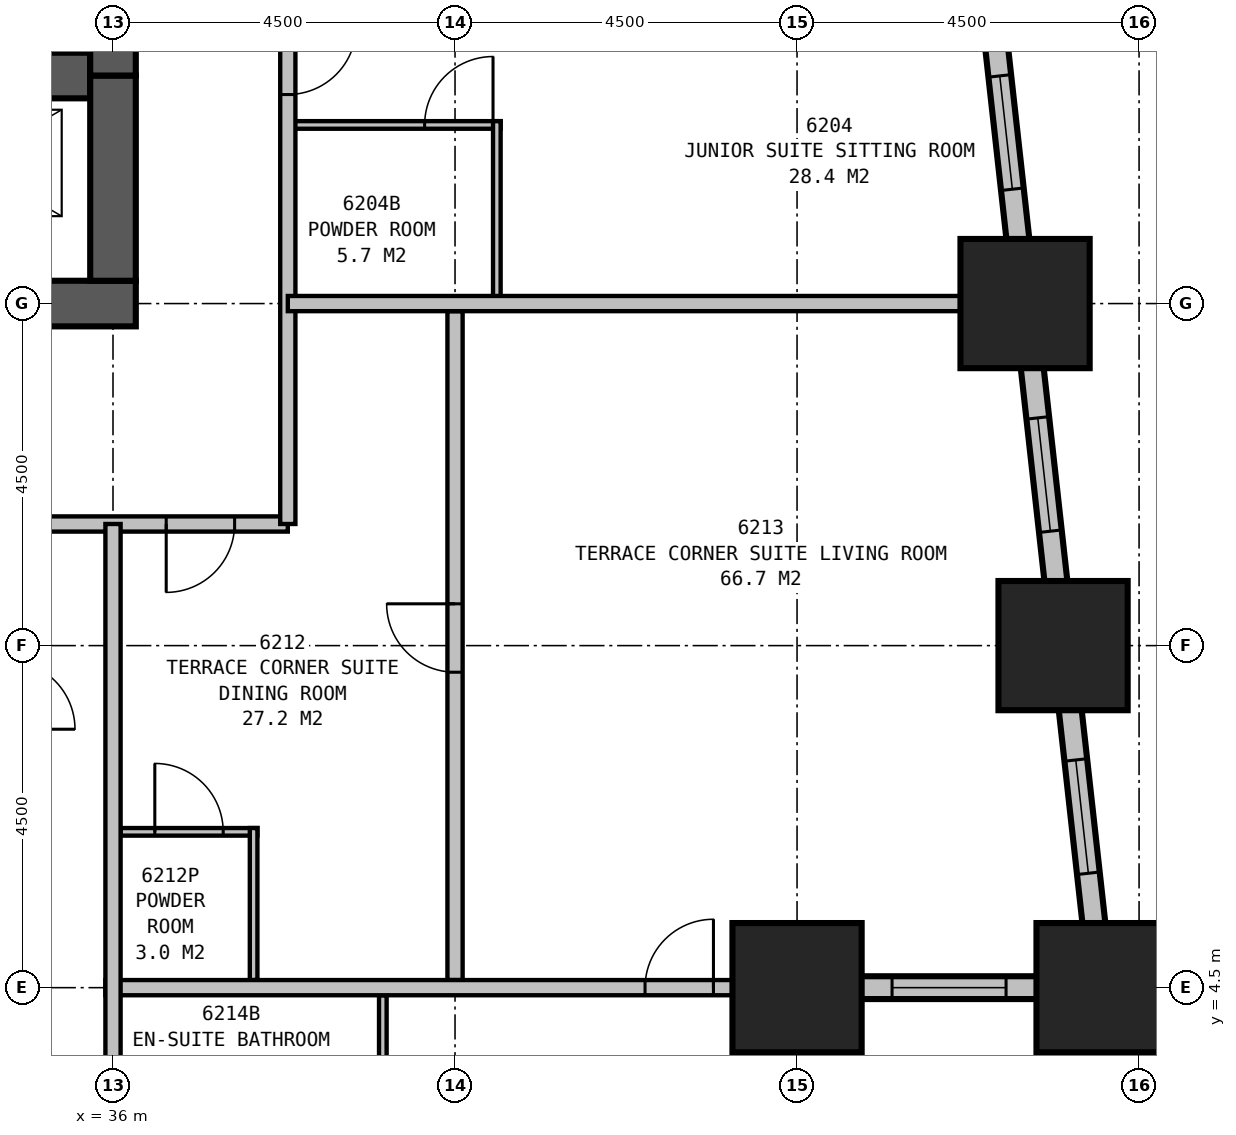
"""IFC4 building model, lengths in metres.
Left out: names, types, materials, properties, quantities, classifications, styles, units other than length and angle.
Written with IfcOpenShell. Run it as: python <this file> out.ifc"""

import sys

from ifc_helpers import new_model, si_unit, direction, frame, frame_2d, origin, origin_2d, place, context, subcontext, project, spatial, rectangle, extrude, element, fill, save


model = new_model("IFC4")
c1 = context("Model", 3, precision=1e-05, world=origin(), true_north=direction((0.0, 1.0)))
c2 = subcontext(c1, "Body", "Model", "MODEL_VIEW")
j1 = project(units=[si_unit("LENGTHUNIT", "METRE"), si_unit("PLANEANGLEUNIT", "RADIAN")], contexts=[c1])
p1 = place(None, origin())
s1 = spatial("IfcSite", under=j1, at=p1, CompositionType="ELEMENT")
p2 = place(p1, origin())
s2 = spatial("IfcBuilding", under=s1, at=p2, CompositionType="ELEMENT")
p3 = place(p2, frame((0.0, 0.0, 240.8)))
s3 = spatial("IfcBuildingStorey", under=s2, at=p3, CompositionType="ELEMENT", Elevation=240.8)
for number, where, z_axis, x_axis in (
    (1, (45.0, 4.5, 0.0), (0.0, 0.0, 1.0), (1.0, 0.0, 0.0)),
    (2, (49.0, 4.5, 0.0), (0.0, 0.0, 1.0), (1.0, 0.0, 0.0)),
    (3, (48.5, 9.0, 0.0), (0.0, 0.0, 1.0), (1.0, 0.0, 0.0)),
    (4, (48.0, 13.5, 0.0), (0.0, 0.0, 1.0), (1.0, 0.0, 0.0)),
):
    element("IfcColumn", number, at=place(p3, frame(where, z_axis=z_axis, x_axis=x_axis)), inside=s3, PredefinedType="COLUMN", context=c2, shape_type="SweptSolid", body=[
        extrude(rectangle(XDim=1.7, YDim=1.7, at=origin_2d()), origin(), (0.0, 0.0, 1.0), 3.9),
    ])
p4 = place(p3, frame((13.2, 13.5, 0.0), z_axis=(0.0, 0.0, 1.0), x_axis=(1.0, 0.0, 0.0)))
e5 = element("IfcWall", 5, at=p4, inside=s3, PredefinedType="SHEAR", context=c2, shape_type="SweptSolid", body=[
    extrude(rectangle(XDim=23.1, YDim=0.6, at=frame_2d((11.55, 0.0))), origin(), (0.0, 0.0, 1.0), 3.9),
])
p5 = place(p3, frame((13.8, 16.5, 0.0), z_axis=(0.0, 0.0, 1.0), x_axis=(1.0, 0.0, 0.0)))
e6 = element("IfcWall", 6, at=p5, inside=s3, PredefinedType="SHEAR", context=c2, shape_type="SweptSolid", body=[
    extrude(rectangle(XDim=21.9, YDim=0.6, at=frame_2d((10.95, 0.0))), origin(), (0.0, 0.0, 1.0), 3.9),
])
p6 = place(p5, frame((5.75, 0.0, 0.0), z_axis=(0.0, 0.0, 1.0), x_axis=(-1.0, 0.0, 0.0)))
e7 = element("IfcOpeningElement", 7, at=p6, cuts=e6, PredefinedType="OPENING", context=c2, shape_type="SweptSolid", body=[
    extrude(rectangle(XDim=1.0, YDim=2.1, at=frame_2d((0.5, 1.05))), frame((0.0, 0.31, 0.0), z_axis=(0.0, -1.0, 0.0), x_axis=(1.0, 0.0, 0.0)), (0.0, 0.0, 1.0), 0.62),
])
p7 = place(p5, frame((10.2, 0.0, 0.0), z_axis=(0.0, 0.0, 1.0), x_axis=(-1.0, 0.0, 0.0)))
e8 = element("IfcOpeningElement", 8, at=p7, cuts=e6, PredefinedType="OPENING", context=c2, shape_type="SweptSolid", body=[
    extrude(rectangle(XDim=1.0, YDim=2.1, at=frame_2d((0.5, 1.05))), frame((0.0, 0.31, 0.0), z_axis=(0.0, -1.0, 0.0), x_axis=(1.0, 0.0, 0.0)), (0.0, 0.0, 1.0), 0.62),
])
p8 = place(p5, frame((12.7, 0.0, 0.0), z_axis=(0.0, 0.0, 1.0), x_axis=(-1.0, 0.0, 0.0)))
e9 = element("IfcOpeningElement", 9, at=p8, cuts=e6, PredefinedType="OPENING", context=c2, shape_type="SweptSolid", body=[
    extrude(rectangle(XDim=1.0, YDim=2.1, at=frame_2d((0.5, 1.05))), frame((0.0, 0.31, 0.0), z_axis=(0.0, -1.0, 0.0), x_axis=(1.0, 0.0, 0.0)), (0.0, 0.0, 1.0), 0.62),
])
p9 = place(p5, frame((17.15, 0.0, 0.0), z_axis=(0.0, 0.0, 1.0), x_axis=(-1.0, 0.0, 0.0)))
e10 = element("IfcOpeningElement", 10, at=p9, cuts=e6, PredefinedType="OPENING", context=c2, shape_type="SweptSolid", body=[
    extrude(rectangle(XDim=1.0, YDim=2.1, at=frame_2d((0.5, 1.05))), frame((0.0, 0.31, 0.0), z_axis=(0.0, -1.0, 0.0), x_axis=(1.0, 0.0, 0.0)), (0.0, 0.0, 1.0), 0.62),
])
p10 = place(p5, frame((0.6, 0.0, 0.0)))
e11 = element("IfcOpeningElement", 11, at=p10, cuts=e6, PredefinedType="OPENING", context=c2, shape_type="SweptSolid", body=[
    extrude(rectangle(XDim=1.2, YDim=2.1, at=frame_2d((0.6, 1.05))), frame((0.0, 0.31, 0.0), z_axis=(0.0, -1.0, 0.0), x_axis=(1.0, 0.0, 0.0)), (0.0, 0.0, 1.0), 0.62),
])
p11 = place(p5, frame((19.6, 0.0, 0.0)))
e12 = element("IfcOpeningElement", 12, at=p11, cuts=e6, PredefinedType="OPENING", context=c2, shape_type="SweptSolid", body=[
    extrude(rectangle(XDim=1.2, YDim=2.1, at=frame_2d((0.6, 1.05))), frame((0.0, 0.31, 0.0), z_axis=(0.0, -1.0, 0.0), x_axis=(1.0, 0.0, 0.0)), (0.0, 0.0, 1.0), 0.62),
])
p12 = place(p3, frame((36.0, 13.8, 0.0), z_axis=(0.0, 0.0, 1.0), x_axis=(0.0, 1.0, 0.0)))
e13 = element("IfcWall", 13, at=p12, inside=s3, PredefinedType="SHEAR", context=c2, shape_type="SweptSolid", body=[
    extrude(rectangle(XDim=2.7, YDim=0.6, at=frame_2d((1.35, 0.0))), origin(), (0.0, 0.0, 1.0), 3.9),
])
p13 = place(p3, frame((36.0, 16.5, 0.0), z_axis=(0.0, 0.0, 1.0), x_axis=(0.0, 1.0, 0.0)))
e14 = element("IfcWall", 14, at=p13, inside=s3, PredefinedType="SHEAR", context=c2, shape_type="SweptSolid", body=[
    extrude(rectangle(XDim=3.5, YDim=0.6, at=frame_2d((1.75, 0.0))), origin(), (0.0, 0.0, 1.0), 3.9),
])
p14 = place(p13, frame((0.65, 0.0, 0.0)))
e15 = element("IfcOpeningElement", 15, at=p14, cuts=e14, PredefinedType="OPENING", context=c2, shape_type="SweptSolid", body=[
    extrude(rectangle(XDim=1.2, YDim=2.1, at=frame_2d((0.6, 1.05))), frame((0.0, 0.31, 0.0), z_axis=(0.0, -1.0, 0.0), x_axis=(1.0, 0.0, 0.0)), (0.0, 0.0, 1.0), 0.62),
])
p15 = place(p3, frame((45.0, -0.15, 0.0), z_axis=(0.0, 0.0, 1.0), x_axis=(0.0, 1.0, 0.0)))
e16 = element("IfcWall", 16, at=p15, inside=s3, PredefinedType="STANDARD", context=c2, shape_type="SweptSolid", body=[
    extrude(rectangle(XDim=4.8, YDim=0.3, at=frame_2d((2.4, 0.0))), origin(), (0.0, 0.0, 1.0), 2.45),
])
p16 = place(p15, frame((1.2, 0.0, 0.5)))
e17 = element("IfcOpeningElement", 17, at=p16, cuts=e16, PredefinedType="OPENING", context=c2, shape_type="SweptSolid", body=[
    extrude(rectangle(XDim=2.4, YDim=1.75, at=frame_2d((1.2, 0.875))), frame((0.0, 0.16, 0.0), z_axis=(0.0, -1.0, 0.0), x_axis=(1.0, 0.0, 0.0)), (0.0, 0.0, 1.0), 0.32),
])
p17 = place(p3, frame((44.85, 4.5, 0.0), z_axis=(0.0, 0.0, 1.0), x_axis=(1.0, 0.0, 0.0)))
e18 = element("IfcWall", 18, at=p17, inside=s3, PredefinedType="STANDARD", context=c2, shape_type="SweptSolid", body=[
    extrude(rectangle(XDim=4.3, YDim=0.3, at=frame_2d((2.15, 0.0))), origin(), (0.0, 0.0, 1.0), 2.45),
])
p18 = place(p17, frame((1.4, 0.0, 0.5)))
e19 = element("IfcOpeningElement", 19, at=p18, cuts=e18, PredefinedType="OPENING", context=c2, shape_type="SweptSolid", body=[
    extrude(rectangle(XDim=1.5, YDim=1.75, at=frame_2d((0.75, 0.875))), frame((0.0, 0.16, 0.0), z_axis=(0.0, -1.0, 0.0), x_axis=(1.0, 0.0, 0.0)), (0.0, 0.0, 1.0), 0.32),
])
p19 = place(p3, frame((49.017, 4.351, 0.0), z_axis=(0.0, 0.0, 1.0), x_axis=(-0.110433201132, 0.993883548555, 0.0)))
e20 = element("IfcWall", 20, at=p19, inside=s3, PredefinedType="STANDARD", context=c2, shape_type="SweptSolid", body=[
    extrude(rectangle(XDim=31.994, YDim=0.3, at=frame_2d((15.997, 0.0))), origin(), (0.0, 0.0, 1.0), 2.45),
])
p20 = place(p19, frame((1.664, 0.0, 0.5)))
e21 = element("IfcOpeningElement", 21, at=p20, cuts=e20, PredefinedType="OPENING", context=c2, shape_type="SweptSolid", body=[
    extrude(rectangle(XDim=1.5, YDim=1.75, at=frame_2d((0.75, 0.875))), frame((0.0, 0.16, 0.0), z_axis=(0.0, -1.0, 0.0), x_axis=(1.0, 0.0, 0.0)), (0.0, 0.0, 1.0), 0.32),
])
p21 = place(p19, frame((6.192, 0.0, 0.5)))
e22 = element("IfcOpeningElement", 22, at=p21, cuts=e20, PredefinedType="OPENING", context=c2, shape_type="SweptSolid", body=[
    extrude(rectangle(XDim=1.5, YDim=1.75, at=frame_2d((0.75, 0.875))), frame((0.0, 0.16, 0.0), z_axis=(0.0, -1.0, 0.0), x_axis=(1.0, 0.0, 0.0)), (0.0, 0.0, 1.0), 0.32),
])
p22 = place(p19, frame((10.719, 0.0, 0.5)))
e23 = element("IfcOpeningElement", 23, at=p22, cuts=e20, PredefinedType="OPENING", context=c2, shape_type="SweptSolid", body=[
    extrude(rectangle(XDim=1.5, YDim=1.75, at=frame_2d((0.75, 0.875))), frame((0.0, 0.16, 0.0), z_axis=(0.0, -1.0, 0.0), x_axis=(1.0, 0.0, 0.0)), (0.0, 0.0, 1.0), 0.32),
])
p23 = place(p19, frame((15.247, 0.0, 0.5)))
e24 = element("IfcOpeningElement", 24, at=p23, cuts=e20, PredefinedType="OPENING", context=c2, shape_type="SweptSolid", body=[
    extrude(rectangle(XDim=1.5, YDim=1.75, at=frame_2d((0.75, 0.875))), frame((0.0, 0.16, 0.0), z_axis=(0.0, -1.0, 0.0), x_axis=(1.0, 0.0, 0.0)), (0.0, 0.0, 1.0), 0.32),
])
p24 = place(p19, frame((19.775, 0.0, 0.5)))
e25 = element("IfcOpeningElement", 25, at=p24, cuts=e20, PredefinedType="OPENING", context=c2, shape_type="SweptSolid", body=[
    extrude(rectangle(XDim=1.5, YDim=1.75, at=frame_2d((0.75, 0.875))), frame((0.0, 0.16, 0.0), z_axis=(0.0, -1.0, 0.0), x_axis=(1.0, 0.0, 0.0)), (0.0, 0.0, 1.0), 0.32),
])
p25 = place(p19, frame((24.302, 0.0, 0.5)))
e26 = element("IfcOpeningElement", 26, at=p25, cuts=e20, PredefinedType="OPENING", context=c2, shape_type="SweptSolid", body=[
    extrude(rectangle(XDim=1.5, YDim=1.75, at=frame_2d((0.75, 0.875))), frame((0.0, 0.16, 0.0), z_axis=(0.0, -1.0, 0.0), x_axis=(1.0, 0.0, 0.0)), (0.0, 0.0, 1.0), 0.32),
])
p26 = place(p19, frame((28.83, 0.0, 0.5)))
e27 = element("IfcOpeningElement", 27, at=p26, cuts=e20, PredefinedType="OPENING", context=c2, shape_type="SweptSolid", body=[
    extrude(rectangle(XDim=1.5, YDim=1.75, at=frame_2d((0.75, 0.875))), frame((0.0, 0.16, 0.0), z_axis=(0.0, -1.0, 0.0), x_axis=(1.0, 0.0, 0.0)), (0.0, 0.0, 1.0), 0.32),
])
p27 = place(p3, frame((26.9, 10.6, 0.0), z_axis=(0.0, 0.0, 1.0), x_axis=(1.0, 0.0, 0.0)))
e28 = element("IfcWall", 28, at=p27, inside=s3, PredefinedType="PARTITIONING", context=c2, shape_type="SweptSolid", body=[
    extrude(rectangle(XDim=11.4, YDim=0.2, at=frame_2d((5.7, 0.0))), origin(), (0.0, 0.0, 1.0), 3.65),
])
p28 = place(p27, frame((1.85, 0.0, 0.0), z_axis=(0.0, 0.0, 1.0), x_axis=(-1.0, 0.0, 0.0)))
e29 = element("IfcOpeningElement", 29, at=p28, cuts=e28, PredefinedType="OPENING", context=c2, shape_type="SweptSolid", body=[
    extrude(rectangle(XDim=0.9, YDim=2.1, at=frame_2d((0.45, 1.05))), frame((0.0, 0.11, 0.0), z_axis=(0.0, -1.0, 0.0), x_axis=(1.0, 0.0, 0.0)), (0.0, 0.0, 1.0), 0.22),
])
p29 = place(p27, frame((10.7, 0.0, 0.0), z_axis=(0.0, 0.0, 1.0), x_axis=(-1.0, 0.0, 0.0)))
e30 = element("IfcOpeningElement", 30, at=p29, cuts=e28, PredefinedType="OPENING", context=c2, shape_type="SweptSolid", body=[
    extrude(rectangle(XDim=0.9, YDim=2.1, at=frame_2d((0.45, 1.05))), frame((0.0, 0.11, 0.0), z_axis=(0.0, -1.0, 0.0), x_axis=(1.0, 0.0, 0.0)), (0.0, 0.0, 1.0), 0.22),
])
p30 = place(p3, frame((38.3, 10.6, 0.0), z_axis=(0.0, 0.0, 1.0), x_axis=(0.0, 1.0, 0.0)))
e31 = element("IfcWall", 31, at=p30, inside=s3, PredefinedType="PARTITIONING", context=c2, shape_type="SweptSolid", body=[
    extrude(rectangle(XDim=18.7, YDim=0.2, at=frame_2d((9.35, 0.0))), origin(), (0.0, 0.0, 1.0), 3.65),
])
p31 = place(p30, frame((6.55, 0.0, 0.0), z_axis=(0.0, 0.0, 1.0), x_axis=(-1.0, 0.0, 0.0)))
e32 = element("IfcOpeningElement", 32, at=p31, cuts=e31, PredefinedType="OPENING", context=c2, shape_type="SweptSolid", body=[
    extrude(rectangle(XDim=0.9, YDim=2.1, at=frame_2d((0.45, 1.05))), frame((0.0, 0.11, 0.0), z_axis=(0.0, -1.0, 0.0), x_axis=(1.0, 0.0, 0.0)), (0.0, 0.0, 1.0), 0.22),
])
p32 = place(p30, frame((16.1, 0.0, 0.0), z_axis=(0.0, 0.0, 1.0), x_axis=(-1.0, 0.0, 0.0)))
e33 = element("IfcOpeningElement", 33, at=p32, cuts=e31, PredefinedType="OPENING", context=c2, shape_type="SweptSolid", body=[
    extrude(rectangle(XDim=1.0, YDim=2.1, at=frame_2d((0.5, 1.05))), frame((0.0, 0.11, 0.0), z_axis=(0.0, -1.0, 0.0), x_axis=(1.0, 0.0, 0.0)), (0.0, 0.0, 1.0), 0.22),
])
p33 = place(p3, frame((41.05, 13.5, 0.0), z_axis=(0.0, 0.0, 1.0), x_axis=(0.0, 1.0, 0.0)))
e34 = element("IfcWall", 34, at=p33, inside=s3, PredefinedType="PLUMBINGWALL", context=c2, shape_type="SweptSolid", body=[
    extrude(rectangle(XDim=2.4, YDim=0.1, at=frame_2d((1.2, 0.0))), origin(), (0.0, 0.0, 1.0), 3.65),
])
p34 = place(p3, frame((38.3, 15.85, 0.0), z_axis=(0.0, 0.0, 1.0), x_axis=(1.0, 0.0, 0.0)))
e35 = element("IfcWall", 35, at=p34, inside=s3, PredefinedType="PLUMBINGWALL", context=c2, shape_type="SweptSolid", body=[
    extrude(rectangle(XDim=2.8, YDim=0.1, at=frame_2d((1.4, 0.0))), origin(), (0.0, 0.0, 1.0), 3.65),
])
p35 = place(p34, frame((1.8, 0.0, 0.0)))
e36 = element("IfcOpeningElement", 36, at=p35, cuts=e35, PredefinedType="OPENING", context=c2, shape_type="SweptSolid", body=[
    extrude(rectangle(XDim=0.9, YDim=2.1, at=frame_2d((0.45, 1.05))), frame((0.0, 0.06, 0.0), z_axis=(0.0, -1.0, 0.0), x_axis=(1.0, 0.0, 0.0)), (0.0, 0.0, 1.0), 0.12),
])
p36 = place(p3, frame((38.3, 13.5, 0.0), z_axis=(0.0, 0.0, 1.0), x_axis=(1.0, 0.0, 0.0)))
e37 = element("IfcWall", 37, at=p36, inside=s3, PredefinedType="PARTITIONING", context=c2, shape_type="SweptSolid", body=[
    extrude(rectangle(XDim=9.921, YDim=0.2, at=frame_2d((4.96, 0.0))), origin(), (0.0, 0.0, 1.0), 2.3),
])
p37 = place(p3, frame((36.0, 10.6, 0.0), z_axis=(0.0, 0.0, 1.0), x_axis=(0.0, -1.0, 0.0)))
e38 = element("IfcWall", 38, at=p37, inside=s3, PredefinedType="PARTITIONING", context=c2, shape_type="SweptSolid", body=[
    extrude(rectangle(XDim=10.6, YDim=0.2, at=frame_2d((5.3, 0.0))), origin(), (0.0, 0.0, 1.0), 2.6),
])
p38 = place(p3, frame((35.9, 4.5, 0.0), z_axis=(0.0, 0.0, 1.0), x_axis=(1.0, 0.0, 0.0)))
e39 = element("IfcWall", 39, at=p38, inside=s3, PredefinedType="PARTITIONING", context=c2, shape_type="SweptSolid", body=[
    extrude(rectangle(XDim=9.1, YDim=0.2, at=frame_2d((4.55, 0.0))), origin(), (0.0, 0.0, 1.0), 3.65),
])
p39 = place(p38, frame((7.1, 0.0, 0.0)))
e40 = element("IfcOpeningElement", 40, at=p39, cuts=e39, PredefinedType="OPENING", context=c2, shape_type="SweptSolid", body=[
    extrude(rectangle(XDim=0.9, YDim=2.1, at=frame_2d((0.45, 1.05))), frame((0.0, 0.11, 0.0), z_axis=(0.0, -1.0, 0.0), x_axis=(1.0, 0.0, 0.0)), (0.0, 0.0, 1.0), 0.22),
])
p40 = place(p3, frame((40.5, 4.6, 0.0), z_axis=(0.0, 0.0, 1.0), x_axis=(0.0, 1.0, 0.0)))
e41 = element("IfcWall", 41, at=p40, inside=s3, PredefinedType="PARTITIONING", context=c2, shape_type="SweptSolid", body=[
    extrude(rectangle(XDim=8.8, YDim=0.2, at=frame_2d((4.4, 0.0))), origin(), (0.0, 0.0, 1.0), 2.6),
])
p41 = place(p40, frame((4.05, 0.0, 0.0)))
e42 = element("IfcOpeningElement", 42, at=p41, cuts=e41, PredefinedType="OPENING", context=c2, shape_type="SweptSolid", body=[
    extrude(rectangle(XDim=0.9, YDim=2.1, at=frame_2d((0.45, 1.05))), frame((0.0, 0.11, 0.0), z_axis=(0.0, -1.0, 0.0), x_axis=(1.0, 0.0, 0.0)), (0.0, 0.0, 1.0), 0.22),
])
p42 = place(p3, frame((37.85, 4.6, 0.0), z_axis=(0.0, 0.0, 1.0), x_axis=(0.0, 1.0, 0.0)))
e43 = element("IfcWall", 43, at=p42, inside=s3, PredefinedType="PLUMBINGWALL", context=c2, shape_type="SweptSolid", body=[
    extrude(rectangle(XDim=2.0, YDim=0.1, at=frame_2d((1.0, 0.0))), origin(), (0.0, 0.0, 1.0), 3.65),
])
p43 = place(p3, frame((36.1, 6.55, 0.0), z_axis=(0.0, 0.0, 1.0), x_axis=(1.0, 0.0, 0.0)))
e44 = element("IfcWall", 44, at=p43, inside=s3, PredefinedType="PLUMBINGWALL", context=c2, shape_type="SweptSolid", body=[
    extrude(rectangle(XDim=1.8, YDim=0.1, at=frame_2d((0.9, 0.0))), origin(), (0.0, 0.0, 1.0), 3.65),
])
p44 = place(p43, frame((0.45, 0.0, 0.0)))
e45 = element("IfcOpeningElement", 45, at=p44, cuts=e44, PredefinedType="OPENING", context=c2, shape_type="SweptSolid", body=[
    extrude(rectangle(XDim=0.9, YDim=2.1, at=frame_2d((0.45, 1.05))), frame((0.0, 0.06, 0.0), z_axis=(0.0, -1.0, 0.0), x_axis=(1.0, 0.0, 0.0)), (0.0, 0.0, 1.0), 0.12),
])
p45 = place(p3, frame((39.55, 4.4, 0.0), z_axis=(0.0, 0.0, 1.0), x_axis=(0.0, -1.0, 0.0)))
e46 = element("IfcWall", 46, at=p45, inside=s3, PredefinedType="PLUMBINGWALL", context=c2, shape_type="SweptSolid", body=[
    extrude(rectangle(XDim=2.3, YDim=0.1, at=frame_2d((1.15, 0.0))), origin(), (0.0, 0.0, 1.0), 3.65),
])
p46 = place(p18, origin())
e47 = element("IfcWindow", 47, at=p46, inside=s3, PartitioningType="SINGLE_PANEL", PredefinedType="WINDOW", context=c2, shape_type="SweptSolid", body=[
    extrude(rectangle(XDim=1.5, YDim=1.75, at=frame_2d((0.75, 0.875))), frame((0.0, 0.03, 0.0), z_axis=(0.0, -1.0, 0.0), x_axis=(1.0, 0.0, 0.0)), (0.0, 0.0, 1.0), 0.06),
])
fill(e19, e47)
p47 = place(p20, origin())
e48 = element("IfcWindow", 48, at=p47, inside=s3, PartitioningType="SINGLE_PANEL", PredefinedType="WINDOW", context=c2, shape_type="SweptSolid", body=[
    extrude(rectangle(XDim=1.5, YDim=1.75, at=frame_2d((0.75, 0.875))), frame((0.0, 0.03, 0.0), z_axis=(0.0, -1.0, 0.0), x_axis=(1.0, 0.0, 0.0)), (0.0, 0.0, 1.0), 0.06),
])
fill(e21, e48)
p48 = place(p21, origin())
e49 = element("IfcWindow", 49, at=p48, inside=s3, PartitioningType="SINGLE_PANEL", PredefinedType="WINDOW", context=c2, shape_type="SweptSolid", body=[
    extrude(rectangle(XDim=1.5, YDim=1.75, at=frame_2d((0.75, 0.875))), frame((0.0, 0.03, 0.0), z_axis=(0.0, -1.0, 0.0), x_axis=(1.0, 0.0, 0.0)), (0.0, 0.0, 1.0), 0.06),
])
fill(e22, e49)
p49 = place(p22, origin())
e50 = element("IfcWindow", 50, at=p49, inside=s3, PartitioningType="SINGLE_PANEL", PredefinedType="WINDOW", context=c2, shape_type="SweptSolid", body=[
    extrude(rectangle(XDim=1.5, YDim=1.75, at=frame_2d((0.75, 0.875))), frame((0.0, 0.03, 0.0), z_axis=(0.0, -1.0, 0.0), x_axis=(1.0, 0.0, 0.0)), (0.0, 0.0, 1.0), 0.06),
])
fill(e23, e50)
p50 = place(p29, origin())
e51 = element("IfcDoor", 51, at=p50, inside=s3, OperationType="SINGLE_SWING_RIGHT", PredefinedType="DOOR", context=c2, shape_type="SweptSolid", body=[
    extrude(rectangle(XDim=0.9, YDim=2.1, at=frame_2d((0.45, 1.05))), frame((0.0, 0.025, 0.0), z_axis=(0.0, -1.0, 0.0), x_axis=(1.0, 0.0, 0.0)), (0.0, 0.0, 1.0), 0.05),
])
fill(e30, e51)
p51 = place(p31, origin())
e52 = element("IfcDoor", 52, at=p51, inside=s3, OperationType="SINGLE_SWING_LEFT", PredefinedType="DOOR", context=c2, shape_type="SweptSolid", body=[
    extrude(rectangle(XDim=0.9, YDim=2.1, at=frame_2d((0.45, 1.05))), frame((0.0, 0.025, 0.0), z_axis=(0.0, -1.0, 0.0), x_axis=(1.0, 0.0, 0.0)), (0.0, 0.0, 1.0), 0.05),
])
fill(e32, e52)
p52 = place(p35, origin())
e53 = element("IfcDoor", 53, at=p52, inside=s3, OperationType="SINGLE_SWING_RIGHT", PredefinedType="DOOR", context=c2, shape_type="SweptSolid", body=[
    extrude(rectangle(XDim=0.9, YDim=2.1, at=frame_2d((0.45, 1.05))), frame((0.0, 0.025, 0.0), z_axis=(0.0, -1.0, 0.0), x_axis=(1.0, 0.0, 0.0)), (0.0, 0.0, 1.0), 0.05),
])
fill(e36, e53)
p53 = place(p39, origin())
e54 = element("IfcDoor", 54, at=p53, inside=s3, OperationType="SINGLE_SWING_RIGHT", PredefinedType="DOOR", context=c2, shape_type="SweptSolid", body=[
    extrude(rectangle(XDim=0.9, YDim=2.1, at=frame_2d((0.45, 1.05))), frame((0.0, 0.025, 0.0), z_axis=(0.0, -1.0, 0.0), x_axis=(1.0, 0.0, 0.0)), (0.0, 0.0, 1.0), 0.05),
])
fill(e40, e54)
p54 = place(p41, origin())
e55 = element("IfcDoor", 55, at=p54, inside=s3, OperationType="SINGLE_SWING_RIGHT", PredefinedType="DOOR", context=c2, shape_type="SweptSolid", body=[
    extrude(rectangle(XDim=0.9, YDim=2.1, at=frame_2d((0.45, 1.05))), frame((0.0, 0.025, 0.0), z_axis=(0.0, -1.0, 0.0), x_axis=(1.0, 0.0, 0.0)), (0.0, 0.0, 1.0), 0.05),
])
fill(e42, e55)
p55 = place(p44, origin())
e56 = element("IfcDoor", 56, at=p55, inside=s3, OperationType="SINGLE_SWING_LEFT", PredefinedType="DOOR", context=c2, shape_type="SweptSolid", body=[
    extrude(rectangle(XDim=0.9, YDim=2.1, at=frame_2d((0.45, 1.05))), frame((0.0, 0.025, 0.0), z_axis=(0.0, -1.0, 0.0), x_axis=(1.0, 0.0, 0.0)), (0.0, 0.0, 1.0), 0.05),
])
fill(e45, e56)
save(model, sys.argv[1])
